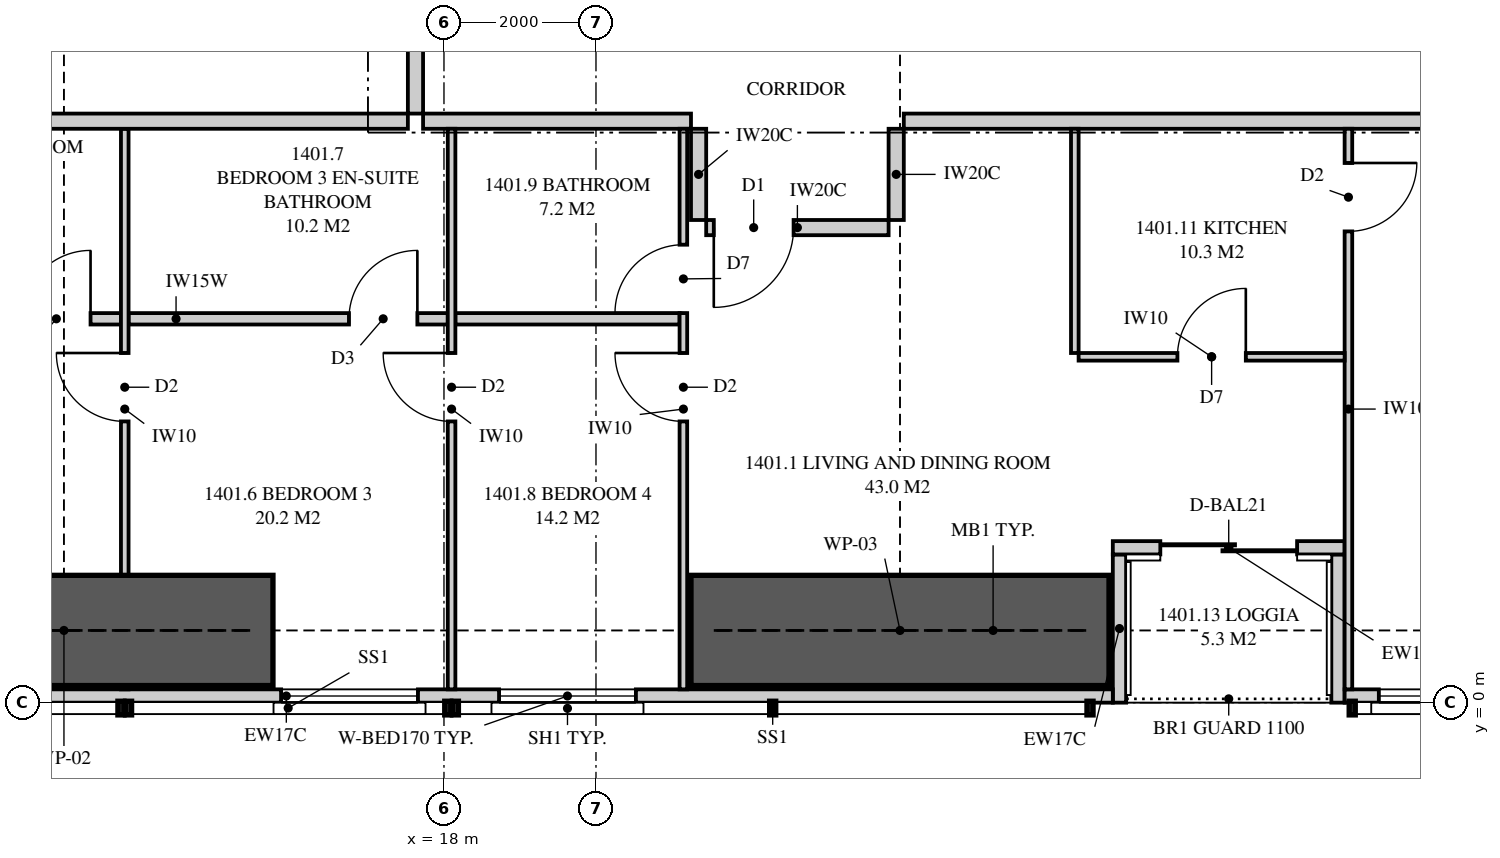
"""IFC4 building model, lengths in metres.
Left out: names, types, materials, properties, quantities, classifications, styles, units other than length and angle.
Written with IfcOpenShell. Run it as: python <this file> out.ifc"""

import sys

from ifc_helpers import new_model, si_unit, direction, frame, frame_2d, origin, place, context, subcontext, project, spatial, polyline, rectangle, outline, extrude, element, fill, save


model = new_model("IFC4")
c1 = context("Model", 3, precision=1e-05, world=origin(), true_north=direction((0.0, 1.0)))
c2 = subcontext(c1, "Body", "Model", "MODEL_VIEW")
j1 = project(units=[si_unit("LENGTHUNIT", "METRE"), si_unit("PLANEANGLEUNIT", "RADIAN")], contexts=[c1])
p1 = place(None, origin())
s1 = spatial("IfcSite", under=j1, at=p1, CompositionType="ELEMENT")
p2 = place(p1, origin())
s2 = spatial("IfcBuilding", under=s1, at=p2, CompositionType="ELEMENT")
p3 = place(p2, frame((0.0, 0.0, 54.5)))
s3 = spatial("IfcBuildingStorey", under=s2, at=p3, CompositionType="ELEMENT", Elevation=54.5)
p4 = place(p3, frame((5.051, 0.087, 0.0), z_axis=(0.0, 0.0, 1.0), x_axis=(1.0, 0.0, 0.0)))
e1 = element("IfcWall", 1, at=p4, inside=s3, PredefinedType="SOLIDWALL", context=c2, shape_type="SweptSolid", body=[
    extrude(outline(polyline([(0.0, 0.0), (21.749, 0.0), (21.749, 2.15), (7.949, 2.15), (7.949, 3.11), (7.793, 3.11), (7.793, 2.15), (7.745, 2.15), (7.745, 3.11), (0.0, 3.11), (0.0, 0.0)])), frame((0.0, 0.087, 0.0), z_axis=(0.0, -1.0, 0.0), x_axis=(1.0, 0.0, 0.0)), (0.0, 0.0, 1.0), 0.175),
])
p5 = place(p4, frame((3.234, 0.0, 0.4)))
e2 = element("IfcOpeningElement", 2, at=p5, cuts=e1, PredefinedType="OPENING", context=c2, shape_type="SweptSolid", body=[
    extrude(rectangle(XDim=1.8, YDim=1.7, at=frame_2d((0.9, 0.85))), frame((0.0, 0.097, 0.0), z_axis=(0.0, -1.0, 0.0), x_axis=(1.0, 0.0, 0.0)), (0.0, 0.0, 1.0), 0.195),
])
p6 = place(p4, frame((10.806, 0.0, 0.4)))
e3 = element("IfcOpeningElement", 3, at=p6, cuts=e1, PredefinedType="OPENING", context=c2, shape_type="SweptSolid", body=[
    extrude(rectangle(XDim=1.8, YDim=1.7, at=frame_2d((0.9, 0.85))), frame((0.0, 0.097, 0.0), z_axis=(0.0, -1.0, 0.0), x_axis=(1.0, 0.0, 0.0)), (0.0, 0.0, 1.0), 0.195),
])
p7 = place(p4, frame((13.674, 0.0, 0.4)))
e4 = element("IfcOpeningElement", 4, at=p7, cuts=e1, PredefinedType="OPENING", context=c2, shape_type="SweptSolid", body=[
    extrude(rectangle(XDim=1.8, YDim=1.7, at=frame_2d((0.9, 0.85))), frame((0.0, 0.097, 0.0), z_axis=(0.0, -1.0, 0.0), x_axis=(1.0, 0.0, 0.0)), (0.0, 0.0, 1.0), 0.195),
])
p8 = place(p3, frame((29.85, 0.087, 0.0), z_axis=(0.0, 0.0, 1.0), x_axis=(1.0, 0.0, 0.0)))
e5 = element("IfcWall", 5, at=p8, inside=s3, PredefinedType="SOLIDWALL", context=c2, shape_type="SweptSolid", body=[
    extrude(outline(polyline([(0.0, 0.0), (8.05, 0.0), (8.05, 3.11), (5.354, 3.11), (5.354, 2.15), (5.306, 2.15), (5.306, 3.11), (5.15, 3.11), (5.15, 2.15), (0.0, 2.15), (0.0, 0.0)])), frame((0.0, 0.087, 0.0), z_axis=(0.0, -1.0, 0.0), x_axis=(1.0, 0.0, 0.0)), (0.0, 0.0, 1.0), 0.175),
])
p9 = place(p8, frame((0.45, 0.0, 0.4)))
e6 = element("IfcOpeningElement", 6, at=p9, cuts=e5, PredefinedType="OPENING", context=c2, shape_type="SweptSolid", body=[
    extrude(rectangle(XDim=1.8, YDim=1.7, at=frame_2d((0.9, 0.85))), frame((0.0, 0.097, 0.0), z_axis=(0.0, -1.0, 0.0), x_axis=(1.0, 0.0, 0.0)), (0.0, 0.0, 1.0), 0.195),
])
p10 = place(p3, frame((26.8, 2.038, 0.0), z_axis=(0.0, 0.0, 1.0), x_axis=(1.0, 0.0, 0.0)))
e7 = element("IfcWall", 7, at=p10, inside=s3, PredefinedType="SOLIDWALL", context=c2, shape_type="SweptSolid", body=[
    extrude(rectangle(XDim=3.05, YDim=0.175, at=frame_2d((1.525, 0.0))), origin(), (0.0, 0.0, 1.0), 3.11),
])
p11 = place(p10, frame((0.625, 0.0, 0.0)))
e8 = element("IfcOpeningElement", 8, at=p11, cuts=e7, PredefinedType="OPENING", context=c2, shape_type="SweptSolid", body=[
    extrude(rectangle(XDim=1.8, YDim=2.1, at=frame_2d((0.9, 1.05))), frame((0.0, 0.097, 0.0), z_axis=(0.0, -1.0, 0.0), x_axis=(1.0, 0.0, 0.0)), (0.0, 0.0, 1.0), 0.195),
])
for number, where, z_axis, x_axis in (
    (9, (26.887, 0.0, 0.0), (0.0, 0.0, 1.0), (0.0, 1.0, 0.0)),
    (10, (29.762, 0.0, 0.0), (0.0, 0.0, 1.0), (0.0, 1.0, 0.0)),
):
    element("IfcWall", number, at=place(p3, frame(where, z_axis=z_axis, x_axis=x_axis)), inside=s3, PredefinedType="SOLIDWALL", context=c2, shape_type="SweptSolid", body=[
        extrude(outline(polyline([(0.0, 0.0), (1.95, 0.0), (1.95, 3.11), (1.75, 3.11), (1.75, 2.15), (0.15, 2.15), (0.15, 3.11), (0.0, 3.11), (0.0, 0.0)])), frame((0.0, 0.087, 0.0), z_axis=(0.0, -1.0, 0.0), x_axis=(1.0, 0.0, 0.0)), (0.0, 0.0, 1.0), 0.175),
    ])
p12 = place(p3, frame((17.725, 7.65, 0.0), z_axis=(0.0, 0.0, 1.0), x_axis=(1.0, 0.0, 0.0)))
e11 = element("IfcWall", 11, at=p12, inside=s3, PredefinedType="PARTITIONING", context=c2, shape_type="SweptSolid", body=[
    extrude(rectangle(XDim=3.525, YDim=0.2, at=frame_2d((1.762, 0.0))), origin(), (0.0, 0.0, 1.0), 3.11),
])
p13 = place(p3, frame((13.8, 0.175, 0.0), z_axis=(0.0, 0.0, 1.0), x_axis=(0.0, 1.0, 0.0)))
e12 = element("IfcWall", 12, at=p13, inside=s3, PredefinedType="PARTITIONING", context=c2, shape_type="SweptSolid", body=[
    extrude(outline(polyline([(1.635, 2.15), (0.0, 2.15), (0.0, 0.0), (7.375, 0.0), (7.375, 3.11), (1.635, 3.11), (1.635, 2.15)]), holes=[polyline([(1.021, 0.133), (0.529, 0.133), (0.529, 0.923), (1.021, 0.923), (1.021, 0.133)]), polyline([(1.021, 1.227), (0.529, 1.227), (0.529, 2.017), (1.021, 2.017), (1.021, 1.227)])]), frame((0.0, 0.05, 0.0), z_axis=(0.0, -1.0, 0.0), x_axis=(1.0, 0.0, 0.0)), (0.0, 0.0, 1.0), 0.1),
])
p14 = place(p13, frame((3.525, 0.0, 0.0)))
e13 = element("IfcOpeningElement", 13, at=p14, cuts=e12, PredefinedType="OPENING", context=c2, shape_type="SweptSolid", body=[
    extrude(rectangle(XDim=0.9, YDim=2.1, at=frame_2d((0.45, 1.05))), frame((0.0, 0.06, 0.0), z_axis=(0.0, -1.0, 0.0), x_axis=(1.0, 0.0, 0.0)), (0.0, 0.0, 1.0), 0.12),
])
p15 = place(p3, frame((18.1, 0.175, 0.0), z_axis=(0.0, 0.0, 1.0), x_axis=(0.0, 1.0, 0.0)))
e14 = element("IfcWall", 14, at=p15, inside=s3, PredefinedType="PARTITIONING", context=c2, shape_type="SweptSolid", body=[
    extrude(outline(polyline([(0.0, 0.0), (7.375, 0.0), (7.375, 3.11), (1.635, 3.11), (1.635, 2.15), (0.0, 2.15), (0.0, 3.11), (0.0, 0.0)])), frame((0.0, 0.05, 0.0), z_axis=(0.0, -1.0, 0.0), x_axis=(1.0, 0.0, 0.0)), (0.0, 0.0, 1.0), 0.1),
])
p16 = place(p15, frame((3.525, 0.0, 0.0)))
e15 = element("IfcOpeningElement", 15, at=p16, cuts=e14, PredefinedType="OPENING", context=c2, shape_type="SweptSolid", body=[
    extrude(rectangle(XDim=0.9, YDim=2.1, at=frame_2d((0.45, 1.05))), frame((0.0, 0.06, 0.0), z_axis=(0.0, -1.0, 0.0), x_axis=(1.0, 0.0, 0.0)), (0.0, 0.0, 1.0), 0.12),
])
p17 = place(p3, frame((21.15, 0.175, 0.0), z_axis=(0.0, 0.0, 1.0), x_axis=(0.0, 1.0, 0.0)))
e16 = element("IfcWall", 16, at=p17, inside=s3, PredefinedType="PARTITIONING", context=c2, shape_type="SweptSolid", body=[
    extrude(outline(polyline([(0.0, 0.0), (7.375, 0.0), (7.375, 3.11), (1.635, 3.11), (1.635, 2.15), (0.0, 2.15), (0.0, 3.11), (0.0, 0.0)])), frame((0.0, 0.05, 0.0), z_axis=(0.0, -1.0, 0.0), x_axis=(1.0, 0.0, 0.0)), (0.0, 0.0, 1.0), 0.1),
])
p18 = place(p17, frame((3.525, 0.0, 0.0)))
e17 = element("IfcOpeningElement", 17, at=p18, cuts=e16, PredefinedType="OPENING", context=c2, shape_type="SweptSolid", body=[
    extrude(rectangle(XDim=0.9, YDim=2.1, at=frame_2d((0.45, 1.05))), frame((0.0, 0.06, 0.0), z_axis=(0.0, -1.0, 0.0), x_axis=(1.0, 0.0, 0.0)), (0.0, 0.0, 1.0), 0.12),
])
p19 = place(p17, frame((4.95, 0.0, 0.0)))
e18 = element("IfcOpeningElement", 18, at=p19, cuts=e16, PredefinedType="OPENING", context=c2, shape_type="SweptSolid", body=[
    extrude(rectangle(XDim=0.9, YDim=2.1, at=frame_2d((0.45, 1.05))), frame((0.0, 0.06, 0.0), z_axis=(0.0, -1.0, 0.0), x_axis=(1.0, 0.0, 0.0)), (0.0, 0.0, 1.0), 0.12),
])
p20 = place(p3, frame((7.85, 5.05, 0.0), z_axis=(0.0, 0.0, 1.0), x_axis=(1.0, 0.0, 0.0)))
e19 = element("IfcWall", 19, at=p20, inside=s3, PredefinedType="PLUMBINGWALL", context=c2, shape_type="SweptSolid", body=[
    extrude(outline(polyline([(0.0, 0.0), (5.9, 0.0), (5.9, 3.11), (5.462, 3.11), (5.462, 2.541), (4.838, 2.541), (4.838, 3.11), (3.635, 3.11), (3.635, 2.51), (1.065, 2.51), (1.065, 3.11), (0.0, 3.11), (0.0, 0.0)])), frame((0.0, 0.075, 0.0), z_axis=(0.0, -1.0, 0.0), x_axis=(1.0, 0.0, 0.0)), (0.0, 0.0, 1.0), 0.15),
])
p21 = place(p20, frame((4.6, 0.0, 0.0)))
e20 = element("IfcOpeningElement", 20, at=p21, cuts=e19, PredefinedType="OPENING", context=c2, shape_type="SweptSolid", body=[
    extrude(rectangle(XDim=0.9, YDim=2.1, at=frame_2d((0.45, 1.05))), frame((0.0, 0.085, 0.0), z_axis=(0.0, -1.0, 0.0), x_axis=(1.0, 0.0, 0.0)), (0.0, 0.0, 1.0), 0.17),
])
p22 = place(p3, frame((13.85, 5.05, 0.0), z_axis=(0.0, 0.0, 1.0), x_axis=(1.0, 0.0, 0.0)))
e21 = element("IfcWall", 21, at=p22, inside=s3, PredefinedType="PLUMBINGWALL", context=c2, shape_type="SweptSolid", body=[
    extrude(rectangle(XDim=4.2, YDim=0.15, at=frame_2d((2.1, 0.0))), origin(), (0.0, 0.0, 1.0), 3.11),
])
p23 = place(p22, frame((2.9, 0.0, 0.0)))
e22 = element("IfcOpeningElement", 22, at=p23, cuts=e21, PredefinedType="OPENING", context=c2, shape_type="SweptSolid", body=[
    extrude(rectangle(XDim=0.9, YDim=2.1, at=frame_2d((0.45, 1.05))), frame((0.0, 0.085, 0.0), z_axis=(0.0, -1.0, 0.0), x_axis=(1.0, 0.0, 0.0)), (0.0, 0.0, 1.0), 0.17),
])
p24 = place(p3, frame((18.15, 5.05, 0.0), z_axis=(0.0, 0.0, 1.0), x_axis=(1.0, 0.0, 0.0)))
e23 = element("IfcWall", 23, at=p24, inside=s3, PredefinedType="PLUMBINGWALL", context=c2, shape_type="SweptSolid", body=[
    extrude(rectangle(XDim=2.95, YDim=0.15, at=frame_2d((1.475, 0.0))), origin(), (0.0, 0.0, 1.0), 3.11),
])
p25 = place(p3, frame((29.9, 0.175, 0.0), z_axis=(0.0, 0.0, 1.0), x_axis=(0.0, 1.0, 0.0)))
e24 = element("IfcWall", 24, at=p25, inside=s3, PredefinedType="PARTITIONING", context=c2, shape_type="SweptSolid", body=[
    extrude(outline(polyline([(0.0, 0.0), (7.375, 0.0), (7.375, 3.11), (1.635, 3.11), (1.635, 2.15), (0.0, 2.15), (0.0, 3.11), (0.0, 0.0)])), frame((0.0, 0.05, 0.0), z_axis=(0.0, -1.0, 0.0), x_axis=(1.0, 0.0, 0.0)), (0.0, 0.0, 1.0), 0.1),
])
p26 = place(p25, frame((6.025, 0.0, 0.0)))
e25 = element("IfcOpeningElement", 25, at=p26, cuts=e24, PredefinedType="OPENING", context=c2, shape_type="SweptSolid", body=[
    extrude(rectangle(XDim=0.9, YDim=2.1, at=frame_2d((0.45, 1.05))), frame((0.0, 0.06, 0.0), z_axis=(0.0, -1.0, 0.0), x_axis=(1.0, 0.0, 0.0)), (0.0, 0.0, 1.0), 0.12),
])
p27 = place(p3, frame((26.35, 4.55, 0.0), z_axis=(0.0, 0.0, 1.0), x_axis=(1.0, 0.0, 0.0)))
e26 = element("IfcWall", 26, at=p27, inside=s3, PredefinedType="PARTITIONING", context=c2, shape_type="SweptSolid", body=[
    extrude(rectangle(XDim=3.5, YDim=0.1, at=frame_2d((1.75, 0.0))), origin(), (0.0, 0.0, 1.0), 3.11),
])
p28 = place(p27, frame((1.3, 0.0, 0.0)))
e27 = element("IfcOpeningElement", 27, at=p28, cuts=e26, PredefinedType="OPENING", context=c2, shape_type="SweptSolid", body=[
    extrude(rectangle(XDim=0.9, YDim=2.1, at=frame_2d((0.45, 1.05))), frame((0.0, 0.06, 0.0), z_axis=(0.0, -1.0, 0.0), x_axis=(1.0, 0.0, 0.0)), (0.0, 0.0, 1.0), 0.12),
])
p29 = place(p3, frame((26.3, 4.6, 0.0), z_axis=(0.0, 0.0, 1.0), x_axis=(0.0, 1.0, 0.0)))
e28 = element("IfcWall", 28, at=p29, inside=s3, PredefinedType="PARTITIONING", context=c2, shape_type="SweptSolid", body=[
    extrude(rectangle(XDim=2.95, YDim=0.1, at=frame_2d((1.475, 0.0))), origin(), (0.0, 0.0, 1.0), 3.11),
])
p30 = place(p3, frame((2.0, 7.65, 0.0), z_axis=(0.0, 0.0, 1.0), x_axis=(1.0, 0.0, 0.0)))
e29 = element("IfcWall", 29, at=p30, inside=s3, PredefinedType="PARTITIONING", context=c2, shape_type="SweptSolid", body=[
    extrude(outline(polyline([(0.0, 0.0), (15.525, 0.0), (15.525, 3.11), (11.337, 3.11), (11.337, 2.541), (10.663, 2.541), (10.663, 3.11), (9.51, 3.11), (9.51, 2.51), (6.89, 2.51), (6.89, 3.11), (2.969, 3.11), (2.969, 2.541), (2.74, 2.541), (2.74, 2.15), (0.896, 2.15), (0.896, 3.11), (0.0, 3.11), (0.0, 0.0)])), frame((0.0, 0.1, 0.0), z_axis=(0.0, -1.0, 0.0), x_axis=(1.0, 0.0, 0.0)), (0.0, 0.0, 1.0), 0.2),
])
p31 = place(p3, frame((17.625, 7.75, 0.0), z_axis=(0.0, 0.0, 1.0), x_axis=(0.0, 1.0, 0.0)))
e30 = element("IfcWall", 30, at=p31, inside=s3, PredefinedType="PARTITIONING", context=c2, shape_type="SweptSolid", body=[
    extrude(outline(polyline([(0.0, 0.0), (16.25, 0.0), (16.25, 3.11), (5.587, 3.11), (5.587, 2.541), (4.913, 2.541), (4.913, 3.11), (0.0, 3.11), (0.0, 0.0)])), frame((0.0, 0.1, 0.0), z_axis=(0.0, -1.0, 0.0), x_axis=(1.0, 0.0, 0.0)), (0.0, 0.0, 1.0), 0.2),
])
p32 = place(p31, frame((7.075, 0.0, 0.0)))
e31 = element("IfcOpeningElement", 31, at=p32, cuts=e30, PredefinedType="OPENING", context=c2, shape_type="SweptSolid", body=[
    extrude(rectangle(XDim=1.05, YDim=2.2, at=frame_2d((0.525, 1.1))), frame((0.0, 0.11, 0.0), z_axis=(0.0, -1.0, 0.0), x_axis=(1.0, 0.0, 0.0)), (0.0, 0.0, 1.0), 0.22),
])
p33 = place(p3, frame((24.05, 7.65, 0.0), z_axis=(0.0, 0.0, 1.0), x_axis=(1.0, 0.0, 0.0)))
e32 = element("IfcWall", 32, at=p33, inside=s3, PredefinedType="PARTITIONING", context=c2, shape_type="SweptSolid", body=[
    extrude(outline(polyline([(0.0, 0.0), (11.65, 0.0), (11.65, 3.11), (11.287, 3.11), (11.287, 2.541), (10.613, 2.541), (10.613, 3.11), (0.287, 3.11), (0.287, 2.541), (0.0, 2.541), (0.0, 3.11), (0.0, 0.0)])), frame((0.0, 0.1, 0.0), z_axis=(0.0, -1.0, 0.0), x_axis=(1.0, 0.0, 0.0)), (0.0, 0.0, 1.0), 0.2),
])
p34 = place(p3, frame((21.45, 6.25, 0.0), z_axis=(0.0, 0.0, 1.0), x_axis=(1.0, 0.0, 0.0)))
e33 = element("IfcWall", 33, at=p34, inside=s3, PredefinedType="PARTITIONING", context=c2, shape_type="SweptSolid", body=[
    extrude(outline(polyline([(0.0, 0.0), (2.4, 0.0), (2.4, 3.11), (2.4, 2.541), (2.213, 2.541), (2.213, 3.11), (0.0, 3.11), (0.0, 0.0)])), frame((0.0, 0.1, 0.0), z_axis=(0.0, -1.0, 0.0), x_axis=(1.0, 0.0, 0.0)), (0.0, 0.0, 1.0), 0.2),
])
p35 = place(p34, frame((0.1, 0.0, 0.0)))
e34 = element("IfcOpeningElement", 34, at=p35, cuts=e33, PredefinedType="OPENING", context=c2, shape_type="SweptSolid", body=[
    extrude(rectangle(XDim=1.05, YDim=2.2, at=frame_2d((0.525, 1.1))), frame((0.0, 0.11, 0.0), z_axis=(0.0, -1.0, 0.0), x_axis=(1.0, 0.0, 0.0)), (0.0, 0.0, 1.0), 0.22),
])
p36 = place(p3, frame((21.35, 7.55, 0.0), z_axis=(0.0, 0.0, 1.0), x_axis=(0.0, -1.0, 0.0)))
e35 = element("IfcWall", 35, at=p36, inside=s3, PredefinedType="PARTITIONING", context=c2, shape_type="SweptSolid", body=[
    extrude(rectangle(XDim=1.2, YDim=0.2, at=frame_2d((0.6, 0.0))), origin(), (0.0, 0.0, 1.0), 3.11),
])
p37 = place(p3, frame((23.95, 7.55, 0.0), z_axis=(0.0, 0.0, 1.0), x_axis=(0.0, -1.0, 0.0)))
e36 = element("IfcWall", 36, at=p37, inside=s3, PredefinedType="PARTITIONING", context=c2, shape_type="SweptSolid", body=[
    extrude(outline(polyline([(0.0, 0.0), (1.2, 0.0), (1.2, 3.11), (1.2, 2.541), (0.0, 2.541), (0.0, 3.11), (0.0, 0.0)])), frame((0.0, 0.1, 0.0), z_axis=(0.0, -1.0, 0.0), x_axis=(1.0, 0.0, 0.0)), (0.0, 0.0, 1.0), 0.2),
])
for number, where, z_axis, x_axis in (
    (37, (10.25, 0.95, 0.0), (0.0, 0.0, 1.0), (1.0, 0.0, 0.0)),
    (38, (21.25, 0.95, 0.0), (0.0, 0.0, 1.0), (1.0, 0.0, 0.0)),
):
    element("IfcWall", number, at=place(p3, frame(where, z_axis=z_axis, x_axis=x_axis)), inside=s3, PredefinedType="SHEAR", context=c2, shape_type="SweptSolid", body=[
        extrude(rectangle(XDim=5.5, YDim=1.45, at=frame_2d((2.75, 0.0))), origin(), (0.0, 0.0, 1.0), 3.35),
    ])
p38 = place(p6, origin())
e39 = element("IfcWindow", 39, at=p38, inside=s3, PartitioningType="SINGLE_PANEL", PredefinedType="WINDOW", context=c2, shape_type="SweptSolid", body=[
    extrude(rectangle(XDim=1.8, YDim=1.7, at=frame_2d((0.9, 0.85))), frame((0.0, 0.03, 0.0), z_axis=(0.0, -1.0, 0.0), x_axis=(1.0, 0.0, 0.0)), (0.0, 0.0, 1.0), 0.06),
])
fill(e3, e39)
p39 = place(p7, origin())
e40 = element("IfcWindow", 40, at=p39, inside=s3, PartitioningType="SINGLE_PANEL", PredefinedType="WINDOW", context=c2, shape_type="SweptSolid", body=[
    extrude(rectangle(XDim=1.8, YDim=1.7, at=frame_2d((0.9, 0.85))), frame((0.0, 0.03, 0.0), z_axis=(0.0, -1.0, 0.0), x_axis=(1.0, 0.0, 0.0)), (0.0, 0.0, 1.0), 0.06),
])
fill(e4, e40)
p40 = place(p11, origin())
e41 = element("IfcDoor", 41, at=p40, inside=s3, OperationType="SLIDING_TO_LEFT", PredefinedType="DOOR", context=c2, shape_type="SweptSolid", body=[
    extrude(rectangle(XDim=1.8, YDim=2.1, at=frame_2d((0.9, 1.05))), frame((0.0, 0.025, 0.0), z_axis=(0.0, -1.0, 0.0), x_axis=(1.0, 0.0, 0.0)), (0.0, 0.0, 1.0), 0.05),
])
fill(e8, e41)
p41 = place(p9, origin())
e42 = element("IfcWindow", 42, at=p41, inside=s3, PartitioningType="SINGLE_PANEL", PredefinedType="WINDOW", context=c2, shape_type="SweptSolid", body=[
    extrude(rectangle(XDim=1.8, YDim=1.7, at=frame_2d((0.9, 0.85))), frame((0.0, 0.03, 0.0), z_axis=(0.0, -1.0, 0.0), x_axis=(1.0, 0.0, 0.0)), (0.0, 0.0, 1.0), 0.06),
])
fill(e6, e42)
p42 = place(p35, frame((1.05, 0.0, 0.0), z_axis=(0.0, 0.0, 1.0), x_axis=(-1.0, 0.0, 0.0)))
e43 = element("IfcDoor", 43, at=p42, inside=s3, OperationType="SINGLE_SWING_RIGHT", PredefinedType="DOOR", context=c2, shape_type="SweptSolid", body=[
    extrude(rectangle(XDim=1.05, YDim=2.2, at=frame_2d((0.525, 1.1))), frame((0.0, 0.025, 0.0), z_axis=(0.0, -1.0, 0.0), x_axis=(1.0, 0.0, 0.0)), (0.0, 0.0, 1.0), 0.05),
])
fill(e34, e43)
p43 = place(p14, origin())
e44 = element("IfcDoor", 44, at=p43, inside=s3, OperationType="SINGLE_SWING_RIGHT", PredefinedType="DOOR", context=c2, shape_type="SweptSolid", body=[
    extrude(rectangle(XDim=0.9, YDim=2.1, at=frame_2d((0.45, 1.05))), frame((0.0, 0.025, 0.0), z_axis=(0.0, -1.0, 0.0), x_axis=(1.0, 0.0, 0.0)), (0.0, 0.0, 1.0), 0.05),
])
fill(e13, e44)
p44 = place(p21, origin())
e45 = element("IfcDoor", 45, at=p44, inside=s3, OperationType="SINGLE_SWING_RIGHT", PredefinedType="DOOR", context=c2, shape_type="SweptSolid", body=[
    extrude(rectangle(XDim=0.9, YDim=2.1, at=frame_2d((0.45, 1.05))), frame((0.0, 0.025, 0.0), z_axis=(0.0, -1.0, 0.0), x_axis=(1.0, 0.0, 0.0)), (0.0, 0.0, 1.0), 0.05),
])
fill(e20, e45)
p45 = place(p16, origin())
e46 = element("IfcDoor", 46, at=p45, inside=s3, OperationType="SINGLE_SWING_RIGHT", PredefinedType="DOOR", context=c2, shape_type="SweptSolid", body=[
    extrude(rectangle(XDim=0.9, YDim=2.1, at=frame_2d((0.45, 1.05))), frame((0.0, 0.025, 0.0), z_axis=(0.0, -1.0, 0.0), x_axis=(1.0, 0.0, 0.0)), (0.0, 0.0, 1.0), 0.05),
])
fill(e15, e46)
p46 = place(p23, origin())
e47 = element("IfcDoor", 47, at=p46, inside=s3, OperationType="SINGLE_SWING_RIGHT", PredefinedType="DOOR", context=c2, shape_type="SweptSolid", body=[
    extrude(rectangle(XDim=0.9, YDim=2.1, at=frame_2d((0.45, 1.05))), frame((0.0, 0.025, 0.0), z_axis=(0.0, -1.0, 0.0), x_axis=(1.0, 0.0, 0.0)), (0.0, 0.0, 1.0), 0.05),
])
fill(e22, e47)
p47 = place(p18, origin())
e48 = element("IfcDoor", 48, at=p47, inside=s3, OperationType="SINGLE_SWING_RIGHT", PredefinedType="DOOR", context=c2, shape_type="SweptSolid", body=[
    extrude(rectangle(XDim=0.9, YDim=2.1, at=frame_2d((0.45, 1.05))), frame((0.0, 0.025, 0.0), z_axis=(0.0, -1.0, 0.0), x_axis=(1.0, 0.0, 0.0)), (0.0, 0.0, 1.0), 0.05),
])
fill(e17, e48)
p48 = place(p19, origin())
e49 = element("IfcDoor", 49, at=p48, inside=s3, OperationType="SINGLE_SWING_LEFT", PredefinedType="DOOR", context=c2, shape_type="SweptSolid", body=[
    extrude(rectangle(XDim=0.9, YDim=2.1, at=frame_2d((0.45, 1.05))), frame((0.0, 0.025, 0.0), z_axis=(0.0, -1.0, 0.0), x_axis=(1.0, 0.0, 0.0)), (0.0, 0.0, 1.0), 0.05),
])
fill(e18, e49)
p49 = place(p26, frame((0.9, 0.0, 0.0), z_axis=(0.0, 0.0, 1.0), x_axis=(-1.0, 0.0, 0.0)))
e50 = element("IfcDoor", 50, at=p49, inside=s3, OperationType="SINGLE_SWING_LEFT", PredefinedType="DOOR", context=c2, shape_type="SweptSolid", body=[
    extrude(rectangle(XDim=0.9, YDim=2.1, at=frame_2d((0.45, 1.05))), frame((0.0, 0.025, 0.0), z_axis=(0.0, -1.0, 0.0), x_axis=(1.0, 0.0, 0.0)), (0.0, 0.0, 1.0), 0.05),
])
fill(e25, e50)
p50 = place(p28, origin())
e51 = element("IfcDoor", 51, at=p50, inside=s3, OperationType="SINGLE_SWING_RIGHT", PredefinedType="DOOR", context=c2, shape_type="SweptSolid", body=[
    extrude(rectangle(XDim=0.9, YDim=2.1, at=frame_2d((0.45, 1.05))), frame((0.0, 0.025, 0.0), z_axis=(0.0, -1.0, 0.0), x_axis=(1.0, 0.0, 0.0)), (0.0, 0.0, 1.0), 0.05),
])
fill(e27, e51)
save(model, sys.argv[1])
